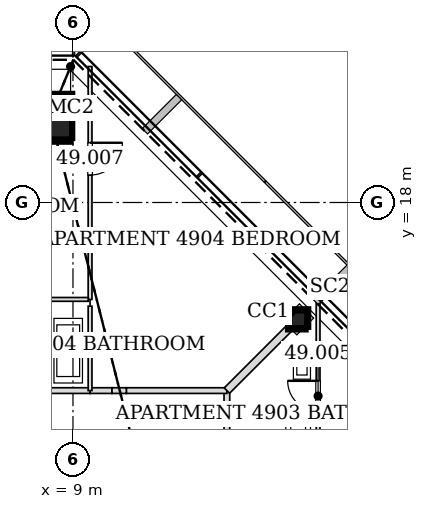
"""IFC4 building model, lengths in metres.
Left out: names, types, materials, properties, quantities, classifications, styles, units other than length and angle.
Written with IfcOpenShell. Run it as: python <this file> out.ifc"""

import sys

from ifc_helpers import new_model, si_unit, direction, frame, frame_2d, origin, origin_2d, place, context, subcontext, project, spatial, rectangle, hollow_rectangle, extrude, element, fill, save


model = new_model("IFC4")
c1 = context("Model", 3, precision=1e-05, world=origin(), true_north=direction((0.0, 1.0)))
c2 = subcontext(c1, "Body", "Model", "MODEL_VIEW")
j1 = project(units=[si_unit("LENGTHUNIT", "METRE"), si_unit("PLANEANGLEUNIT", "RADIAN")], contexts=[c1])
p1 = place(None, origin())
s1 = spatial("IfcSite", under=j1, at=p1, CompositionType="ELEMENT")
p2 = place(p1, origin())
s2 = spatial("IfcBuilding", under=s1, at=p2, CompositionType="ELEMENT")
p3 = place(p2, frame((0.0, 0.0, 214.2)))
s3 = spatial("IfcBuildingStorey", under=s2, at=p3, CompositionType="ELEMENT", Elevation=214.2)
p4 = place(p3, frame((8.399, 20.277, 0.0), z_axis=(-0.011770162649, -0.02827709807, 0.999530824435), x_axis=(0.923215513192, -0.3842825994, 0.0)))
e1 = element("IfcColumn", 1, at=p4, inside=s3, PredefinedType="COLUMN", context=c2, shape_type="SweptSolid", body=[
    extrude(hollow_rectangle(XDim=1.2, YDim=1.2, WallThickness=0.055, at=origin_2d()), origin(), (0.0, 0.0, 1.0), 3.402),
])
p5 = place(p3, frame((14.959, 14.959, 0.0), z_axis=(-0.019953277583, -0.019953277583, 0.999601787427), x_axis=(0.707106781187, -0.707106781187, 0.0)))
e2 = element("IfcColumn", 2, at=p5, inside=s3, PredefinedType="COLUMN", context=c2, shape_type="SweptSolid", body=[
    extrude(hollow_rectangle(XDim=0.5, YDim=0.5, WallThickness=0.025, at=origin_2d()), origin(), (0.0, 0.0, 1.0), 3.402),
])
p6 = place(p3, frame((13.05, 10.849, 0.0), z_axis=(0.0, 0.0, 1.0), x_axis=(0.0, 1.0, 0.0)))
e3 = element("IfcWall", 3, at=p6, inside=s3, PredefinedType="PARTITIONING", context=c2, shape_type="SweptSolid", body=[
    extrude(rectangle(XDim=2.201, YDim=0.15, at=frame_2d((1.101, 0.0))), origin(), (0.0, 0.0, 1.0), 2.578),
])
p7 = place(p3, frame((13.05, 13.05, 0.0), z_axis=(0.0, 0.0, 1.0), x_axis=(-1.0, 0.0, 0.0)))
e4 = element("IfcWall", 4, at=p7, inside=s3, PredefinedType="PARTITIONING", context=c2, shape_type="SweptSolid", body=[
    extrude(rectangle(XDim=2.646, YDim=0.15, at=frame_2d((1.323, 0.0))), origin(), (0.0, 0.0, 1.0), 2.578),
])
p8 = place(p3, frame((10.027, 13.05, 0.0), z_axis=(0.0, 0.0, 1.0), x_axis=(-1.0, 0.0, 0.0)))
e5 = element("IfcWall", 5, at=p8, inside=s3, PredefinedType="PARTITIONING", context=c2, shape_type="SweptSolid", body=[
    extrude(rectangle(XDim=0.578, YDim=0.15, at=frame_2d((0.289, 0.0))), origin(), (0.0, 0.0, 1.0), 3.2),
])
p9 = place(p3, frame((10.404, 13.05, 0.0), z_axis=(0.0, 0.0, 1.0), x_axis=(-1.0, 0.0, 0.0)))
e6 = element("IfcWall", 6, at=p9, inside=s3, PredefinedType="PARTITIONING", context=c2, shape_type="SweptSolid", body=[
    extrude(rectangle(XDim=0.377, YDim=0.15, at=frame_2d((0.188, 0.0))), origin(), (0.0, 0.0, 1.0), 2.268),
])
p10 = place(p3, frame((9.451, 13.05, 0.0), z_axis=(0.0, 0.0, 1.0), x_axis=(-1.0, 0.0, 0.0)))
e7 = element("IfcWall", 7, at=p10, inside=s3, PredefinedType="PARTITIONING", context=c2, shape_type="SweptSolid", body=[
    extrude(rectangle(XDim=2.202, YDim=0.15, at=frame_2d((1.101, 0.0))), origin(), (0.0, 0.0, 1.0), 3.2),
])
p11 = place(p3, frame((15.45, 10.85, 0.0), z_axis=(0.0, 0.0, 1.0), x_axis=(0.0, 1.0, 0.0)))
e8 = element("IfcWall", 8, at=p11, inside=s3, PredefinedType="PARTITIONING", context=c2, shape_type="SweptSolid", body=[
    extrude(rectangle(XDim=4.617, YDim=0.1, at=frame_2d((2.309, 0.0))), origin(), (0.0, 0.0, 1.0), 2.784),
])
p12 = place(p11, frame((1.656, 0.0, 0.0)))
e9 = element("IfcOpeningElement", 9, at=p12, cuts=e8, PredefinedType="OPENING", context=c2, shape_type="SweptSolid", body=[
    extrude(rectangle(XDim=0.8, YDim=2.1, at=frame_2d((0.4, 1.05))), frame((0.0, 0.06, 0.0), z_axis=(0.0, -1.0, 0.0), x_axis=(1.0, 0.0, 0.0)), (0.0, 0.0, 1.0), 0.12),
])
p13 = place(p3, frame((14.701, 14.701, 0.0), z_axis=(0.0, 0.0, 1.0), x_axis=(-0.707106781187, -0.707106781187, 0.0)))
e10 = element("IfcWall", 10, at=p13, inside=s3, PredefinedType="PARTITIONING", context=c2, shape_type="SweptSolid", body=[
    extrude(rectangle(XDim=2.334, YDim=0.2, at=frame_2d((1.167, 0.0))), origin(), (0.0, 0.0, 1.0), 2.578),
])
p14 = place(p3, frame((9.45, 15.271, 0.0), z_axis=(0.0, 0.0, 1.0), x_axis=(0.0, -1.0, 0.0)))
e11 = element("IfcWall", 11, at=p14, inside=s3, PredefinedType="PARTITIONING", context=c2, shape_type="SweptSolid", body=[
    extrude(rectangle(XDim=2.221, YDim=0.1, at=frame_2d((1.111, 0.0))), origin(), (0.0, 0.0, 1.0), 2.591),
])
p15 = place(p3, frame((9.45, 21.578, 0.0), z_axis=(0.0, 0.0, 1.0), x_axis=(0.0, -1.0, 0.0)))
e12 = element("IfcWall", 12, at=p15, inside=s3, PredefinedType="PARTITIONING", context=c2, shape_type="SweptSolid", body=[
    extrude(rectangle(XDim=4.855, YDim=0.1, at=frame_2d((2.428, 0.0))), origin(), (0.0, 0.0, 1.0), 2.784),
])
p16 = place(p15, frame((2.006, 0.0, 0.0)))
e13 = element("IfcOpeningElement", 13, at=p16, cuts=e12, PredefinedType="OPENING", context=c2, shape_type="SweptSolid", body=[
    extrude(rectangle(XDim=0.85, YDim=2.1, at=frame_2d((0.425, 1.05))), frame((0.0, 0.06, 0.0), z_axis=(0.0, -1.0, 0.0), x_axis=(1.0, 0.0, 0.0)), (0.0, 0.0, 1.0), 0.12),
])
p17 = place(p3, frame((9.45, 16.722, 0.0), z_axis=(0.0, 0.0, 1.0), x_axis=(0.0, -1.0, 0.0)))
e14 = element("IfcWall", 14, at=p17, inside=s3, PredefinedType="PARTITIONING", context=c2, shape_type="SweptSolid", body=[
    extrude(rectangle(XDim=1.273, YDim=0.1, at=frame_2d((0.637, 0.0))), origin(), (0.0, 0.0, 1.0), 2.268),
])
p18 = place(p3, frame((9.404, 15.45, 0.0), z_axis=(0.0, 0.0, 1.0), x_axis=(-1.0, 0.0, 0.0)))
e15 = element("IfcWall", 15, at=p18, inside=s3, PredefinedType="PARTITIONING", context=c2, shape_type="SweptSolid", body=[
    extrude(rectangle(XDim=2.154, YDim=0.1, at=frame_2d((1.077, 0.0))), origin(), (0.0, 0.0, 1.0), 3.2),
])
p19 = place(p12, origin())
e16 = element("IfcDoor", 16, at=p19, inside=s3, OperationType="SINGLE_SWING_RIGHT", PredefinedType="DOOR", context=c2, shape_type="SweptSolid", body=[
    extrude(rectangle(XDim=0.8, YDim=2.1, at=frame_2d((0.4, 1.05))), frame((0.0, 0.025, 0.0), z_axis=(0.0, -1.0, 0.0), x_axis=(1.0, 0.0, 0.0)), (0.0, 0.0, 1.0), 0.05),
])
fill(e9, e16)
p20 = place(p16, origin())
e17 = element("IfcDoor", 17, at=p20, inside=s3, OperationType="SINGLE_SWING_LEFT", PredefinedType="DOOR", context=c2, shape_type="SweptSolid", body=[
    extrude(rectangle(XDim=0.85, YDim=2.1, at=frame_2d((0.425, 1.05))), frame((0.0, 0.025, 0.0), z_axis=(0.0, -1.0, 0.0), x_axis=(1.0, 0.0, 0.0)), (0.0, 0.0, 1.0), 0.05),
])
fill(e13, e17)
save(model, sys.argv[1])
